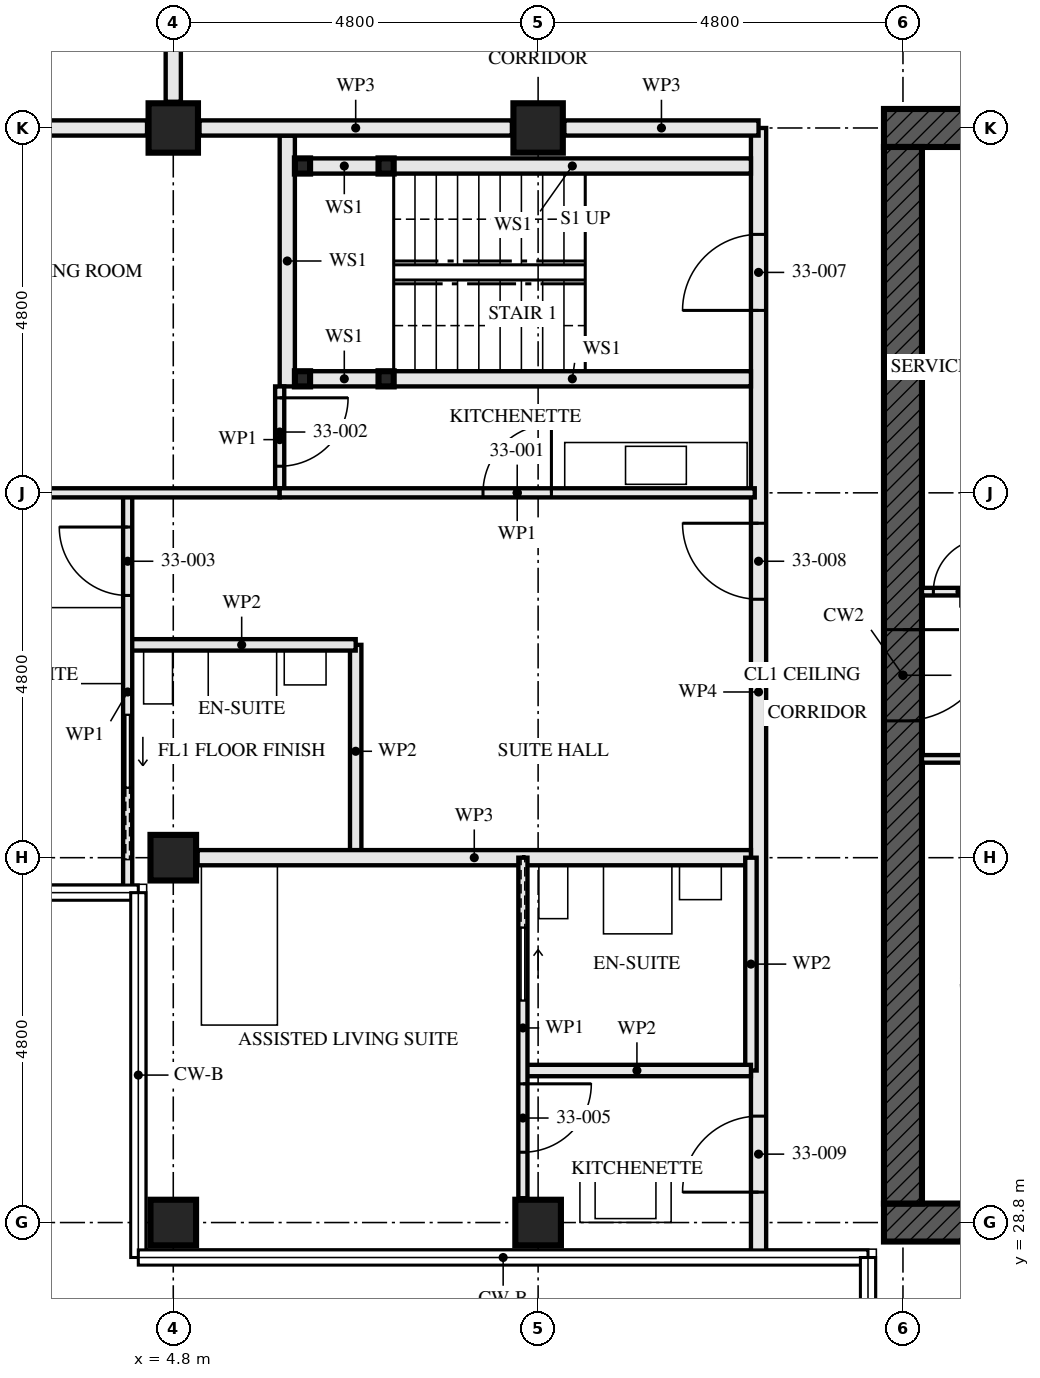
"""IFC4 building model, lengths in metres.
Left out: names, types, materials, properties, quantities, classifications, styles, units other than length and angle.
Written with IfcOpenShell. Run it as: python <this file> out.ifc"""

import sys

from ifc_helpers import new_model, si_unit, direction, frame, frame_2d, origin, origin_2d, place, context, subcontext, project, spatial, rectangle, hollow_rectangle, extrude, element, fill, save


model = new_model("IFC4")
c1 = context("Model", 3, precision=1e-05, world=origin(), true_north=direction((0.0, 1.0)))
c2 = subcontext(c1, "Body", "Model", "MODEL_VIEW")
j1 = project(units=[si_unit("LENGTHUNIT", "METRE"), si_unit("PLANEANGLEUNIT", "RADIAN")], contexts=[c1])
p1 = place(None, origin())
s1 = spatial("IfcSite", under=j1, at=p1, CompositionType="ELEMENT")
p2 = place(p1, origin())
s2 = spatial("IfcBuilding", under=s1, at=p2, CompositionType="ELEMENT")
p3 = place(p2, frame((0.0, 0.0, 122.5)))
s3 = spatial("IfcBuildingStorey", under=s2, at=p3, CompositionType="ELEMENT", Elevation=122.5)
for number, where, z_axis, x_axis in (
    (1, (4.8, 28.8, 0.0), (0.0, 0.0, 1.0), (0.0, 1.0, 0.0)),
    (2, (4.8, 33.6, 0.0), (0.0, 0.0, 1.0), (0.0, 1.0, 0.0)),
):
    element("IfcColumn", number, at=place(p3, frame(where, z_axis=z_axis, x_axis=x_axis)), inside=s3, PredefinedType="COLUMN", context=c2, shape_type="SweptSolid", body=[
        extrude(hollow_rectangle(XDim=0.6, YDim=0.6, WallThickness=0.08, at=origin_2d()), origin(), (0.0, 0.0, 1.0), 3.5),
    ])
p4 = place(p3, frame((4.8, 43.2, 0.0), z_axis=(0.0, 0.0, 1.0), x_axis=(0.0, 1.0, 0.0)))
e3 = element("IfcColumn", 3, at=p4, inside=s3, PredefinedType="COLUMN", context=c2, shape_type="SweptSolid", body=[
    extrude(hollow_rectangle(XDim=0.65, YDim=0.65, WallThickness=0.05, at=origin_2d()), origin(), (0.0, 0.0, 1.0), 3.5),
])
p5 = place(p3, frame((9.6, 28.8, 0.0), z_axis=(0.0, 0.0, 1.0), x_axis=(0.0, 1.0, 0.0)))
e4 = element("IfcColumn", 4, at=p5, inside=s3, PredefinedType="COLUMN", context=c2, shape_type="SweptSolid", body=[
    extrude(hollow_rectangle(XDim=0.6, YDim=0.6, WallThickness=0.08, at=origin_2d()), origin(), (0.0, 0.0, 1.0), 3.5),
])
p6 = place(p3, frame((9.6, 43.2, 0.0), z_axis=(0.0, 0.0, 1.0), x_axis=(0.0, 1.0, 0.0)))
e5 = element("IfcColumn", 5, at=p6, inside=s3, PredefinedType="COLUMN", context=c2, shape_type="SweptSolid", body=[
    extrude(hollow_rectangle(XDim=0.65, YDim=0.65, WallThickness=0.05, at=origin_2d()), origin(), (0.0, 0.0, 1.0), 3.5),
])
p7 = place(p3, frame((14.15, 28.8, -0.17), z_axis=(0.0, 0.0, 1.0), x_axis=(1.0, 0.0, 0.0)))
e6 = element("IfcWall", 6, at=p7, inside=s3, PredefinedType="SHEAR", context=c2, shape_type="SweptSolid", body=[
    extrude(rectangle(XDim=14.9, YDim=0.5, at=frame_2d((7.45, 0.0))), origin(), (0.0, 0.0, 1.0), 3.5),
])
p8 = place(p7, frame((6.85, 0.0, 0.17)))
e7 = element("IfcOpeningElement", 7, at=p8, cuts=e6, PredefinedType="OPENING", context=c2, shape_type="SweptSolid", body=[
    extrude(rectangle(XDim=1.2, YDim=2.1, at=frame_2d((0.6, 1.05))), frame((0.0, 0.26, 0.0), z_axis=(0.0, -1.0, 0.0), x_axis=(1.0, 0.0, 0.0)), (0.0, 0.0, 1.0), 0.521),
])
p9 = place(p3, frame((29.05, 43.2, -0.17), z_axis=(0.0, 0.0, 1.0), x_axis=(-1.0, 0.0, 0.0)))
e8 = element("IfcWall", 8, at=p9, inside=s3, PredefinedType="SHEAR", context=c2, shape_type="SweptSolid", body=[
    extrude(rectangle(XDim=14.9, YDim=0.5, at=frame_2d((7.45, 0.0))), origin(), (0.0, 0.0, 1.0), 3.5),
])
p10 = place(p9, frame((6.85, 0.0, 0.17)))
e9 = element("IfcOpeningElement", 9, at=p10, cuts=e8, PredefinedType="OPENING", context=c2, shape_type="SweptSolid", body=[
    extrude(rectangle(XDim=1.2, YDim=2.1, at=frame_2d((0.6, 1.05))), frame((0.0, 0.26, 0.0), z_axis=(0.0, -1.0, 0.0), x_axis=(1.0, 0.0, 0.0)), (0.0, 0.0, 1.0), 0.521),
])
p11 = place(p3, frame((14.4, 42.95, -0.17), z_axis=(0.0, 0.0, 1.0), x_axis=(0.0, -1.0, 0.0)))
e10 = element("IfcWall", 10, at=p11, inside=s3, PredefinedType="SHEAR", context=c2, shape_type="SweptSolid", body=[
    extrude(rectangle(XDim=13.9, YDim=0.5, at=frame_2d((6.95, 0.0))), origin(), (0.0, 0.0, 1.0), 3.5),
])
p12 = place(p11, frame((6.35, 0.0, 0.17)))
e11 = element("IfcOpeningElement", 11, at=p12, cuts=e10, PredefinedType="OPENING", context=c2, shape_type="SweptSolid", body=[
    extrude(rectangle(XDim=1.2, YDim=2.1, at=frame_2d((0.6, 1.05))), frame((0.0, 0.26, 0.0), z_axis=(0.0, -1.0, 0.0), x_axis=(1.0, 0.0, 0.0)), (0.0, 0.0, 1.0), 0.521),
])
for number, where, z_axis, x_axis in (
    (12, (6.5, 42.7, 0.0), (0.0, 0.0, 1.0), (1.0, 0.0, 0.0)),
    (13, (6.5, 39.9, 0.0), (0.0, 0.0, 1.0), (1.0, 0.0, 0.0)),
    (14, (7.6, 42.7, 0.0), (0.0, 0.0, 1.0), (1.0, 0.0, 0.0)),
    (15, (7.6, 39.9, 0.0), (0.0, 0.0, 1.0), (1.0, 0.0, 0.0)),
):
    element("IfcColumn", number, at=place(p3, frame(where, z_axis=z_axis, x_axis=x_axis)), inside=s3, PredefinedType="COLUMN", context=c2, shape_type="SweptSolid", body=[
        extrude(hollow_rectangle(XDim=0.2, YDim=0.2, WallThickness=0.008, at=origin_2d()), origin(), (0.0, 0.0, 1.0), 3.33),
    ])
p13 = place(p3, frame((6.6, 42.7, 0.0), z_axis=(0.0, 0.0, 1.0), x_axis=(1.0, 0.0, 0.0)))
e16 = element("IfcWall", 16, at=p13, inside=s3, PredefinedType="SOLIDWALL", context=c2, shape_type="SweptSolid", body=[
    extrude(rectangle(XDim=0.9, YDim=0.2, at=frame_2d((0.45, 0.0))), origin(), (0.0, 0.0, 1.0), 2.99),
])
p14 = place(p3, frame((7.7, 42.7, 0.0), z_axis=(0.0, 0.0, 1.0), x_axis=(1.0, 0.0, 0.0)))
e17 = element("IfcWall", 17, at=p14, inside=s3, PredefinedType="SOLIDWALL", context=c2, shape_type="SweptSolid", body=[
    extrude(rectangle(XDim=4.7, YDim=0.2, at=frame_2d((2.35, 0.0))), origin(), (0.0, 0.0, 1.0), 2.99),
])
p15 = place(p3, frame((6.6, 39.9, 0.0), z_axis=(0.0, 0.0, 1.0), x_axis=(1.0, 0.0, 0.0)))
e18 = element("IfcWall", 18, at=p15, inside=s3, PredefinedType="SOLIDWALL", context=c2, shape_type="SweptSolid", body=[
    extrude(rectangle(XDim=0.9, YDim=0.2, at=frame_2d((0.45, 0.0))), origin(), (0.0, 0.0, 1.0), 2.99),
])
p16 = place(p3, frame((7.7, 39.9, 0.0), z_axis=(0.0, 0.0, 1.0), x_axis=(1.0, 0.0, 0.0)))
e19 = element("IfcWall", 19, at=p16, inside=s3, PredefinedType="SOLIDWALL", context=c2, shape_type="SweptSolid", body=[
    extrude(rectangle(XDim=4.7, YDim=0.2, at=frame_2d((2.35, 0.0))), origin(), (0.0, 0.0, 1.0), 2.99),
])
p17 = place(p3, frame((6.3, 43.1, 0.0), z_axis=(0.0, 0.0, 1.0), x_axis=(0.0, -1.0, 0.0)))
e20 = element("IfcWall", 20, at=p17, inside=s3, PredefinedType="SOLIDWALL", context=c2, shape_type="SweptSolid", body=[
    extrude(rectangle(XDim=3.3, YDim=0.2, at=frame_2d((1.65, 0.0))), origin(), (0.0, 0.0, 1.0), 3.33),
])
p18 = place(p3, frame((4.2, 36.4, 0.0), z_axis=(0.0, 0.0, 1.0), x_axis=(1.0, 0.0, 0.0)))
e21 = element("IfcWall", 21, at=p18, inside=s3, PredefinedType="PARTITIONING", context=c2, shape_type="SweptSolid", body=[
    extrude(rectangle(XDim=3.0, YDim=0.15, at=frame_2d((1.5, 0.0))), origin(), (0.0, 0.0, 1.0), 3.33),
])
p19 = place(p3, frame((7.2, 36.4, 0.0), z_axis=(0.0, 0.0, 1.0), x_axis=(0.0, -1.0, 0.0)))
e22 = element("IfcWall", 22, at=p19, inside=s3, PredefinedType="PARTITIONING", context=c2, shape_type="SweptSolid", body=[
    extrude(rectangle(XDim=2.8, YDim=0.15, at=frame_2d((1.4, 0.0))), origin(), (0.0, 0.0, 1.0), 3.33),
])
p20 = place(p3, frame((6.2, 38.4, 0.0), z_axis=(0.0, 0.0, 1.0), x_axis=(1.0, 0.0, 0.0)))
e23 = element("IfcWall", 23, at=p20, inside=s3, PredefinedType="PARTITIONING", context=c2, shape_type="SweptSolid", body=[
    extrude(rectangle(XDim=6.25, YDim=0.12, at=frame_2d((3.125, 0.0))), origin(), (0.0, 0.0, 1.0), 2.55),
])
p21 = place(p20, frame((2.675, 0.0, 0.0)))
e24 = element("IfcOpeningElement", 24, at=p21, cuts=e23, PredefinedType="OPENING", context=c2, shape_type="SweptSolid", body=[
    extrude(rectangle(XDim=0.9, YDim=2.1, at=frame_2d((0.45, 1.05))), frame((0.0, 0.071, 0.0), z_axis=(0.0, -1.0, 0.0), x_axis=(1.0, 0.0, 0.0)), (0.0, 0.0, 1.0), 0.141),
])
p22 = place(p3, frame((6.2, 39.8, 0.0), z_axis=(0.0, 0.0, 1.0), x_axis=(0.0, -1.0, 0.0)))
e25 = element("IfcWall", 25, at=p22, inside=s3, PredefinedType="PARTITIONING", context=c2, shape_type="SweptSolid", body=[
    extrude(rectangle(XDim=1.4, YDim=0.12, at=frame_2d((0.7, 0.0))), origin(), (0.0, 0.0, 1.0), 3.33),
])
p23 = place(p22, frame((0.15, 0.0, 0.0)))
e26 = element("IfcOpeningElement", 26, at=p23, cuts=e25, PredefinedType="OPENING", context=c2, shape_type="SweptSolid", body=[
    extrude(rectangle(XDim=0.9, YDim=2.1, at=frame_2d((0.45, 1.05))), frame((0.0, 0.071, 0.0), z_axis=(0.0, -1.0, 0.0), x_axis=(1.0, 0.0, 0.0)), (0.0, 0.0, 1.0), 0.141),
])
p24 = place(p3, frame((4.2, 38.4, 0.0), z_axis=(0.0, 0.0, 1.0), x_axis=(0.0, -1.0, 0.0)))
e27 = element("IfcWall", 27, at=p24, inside=s3, PredefinedType="PARTITIONING", context=c2, shape_type="SweptSolid", body=[
    extrude(rectangle(XDim=5.24, YDim=0.12, at=frame_2d((2.62, 0.0))), origin(), (0.0, 0.0, 1.0), 2.32),
])
p25 = place(p24, frame((0.45, 0.0, 0.0)))
e28 = element("IfcOpeningElement", 28, at=p25, cuts=e27, PredefinedType="OPENING", context=c2, shape_type="SweptSolid", body=[
    extrude(rectangle(XDim=0.9, YDim=2.1, at=frame_2d((0.45, 1.05))), frame((0.0, 0.071, 0.0), z_axis=(0.0, -1.0, 0.0), x_axis=(1.0, 0.0, 0.0)), (0.0, 0.0, 1.0), 0.141),
])
p26 = place(p24, frame((2.925, 0.0, 0.0)))
e29 = element("IfcOpeningElement", 29, at=p26, cuts=e27, PredefinedType="OPENING", context=c2, shape_type="SweptSolid", body=[
    extrude(rectangle(XDim=0.95, YDim=2.1, at=frame_2d((0.475, 1.05))), frame((0.0, 0.071, 0.0), z_axis=(0.0, -1.0, 0.0), x_axis=(1.0, 0.0, 0.0)), (0.0, 0.0, 1.0), 0.141),
])
p27 = place(p3, frame((0.32, 38.4, 0.0), z_axis=(0.0, 0.0, 1.0), x_axis=(1.0, 0.0, 0.0)))
e30 = element("IfcWall", 30, at=p27, inside=s3, PredefinedType="PARTITIONING", context=c2, shape_type="SweptSolid", body=[
    extrude(rectangle(XDim=5.88, YDim=0.12, at=frame_2d((2.94, 0.0))), origin(), (0.0, 0.0, 1.0), 2.55),
])
p28 = place(p3, frame((5.12, 33.6, 0.0), z_axis=(0.0, 0.0, 1.0), x_axis=(1.0, 0.0, 0.0)))
e31 = element("IfcWall", 31, at=p28, inside=s3, PredefinedType="PARTITIONING", context=c2, shape_type="SweptSolid", body=[
    extrude(rectangle(XDim=7.28, YDim=0.2, at=frame_2d((3.64, 0.0))), origin(), (0.0, 0.0, 1.0), 2.55),
])
p29 = place(p3, frame((9.4, 30.8, 0.0), z_axis=(0.0, 0.0, 1.0), x_axis=(1.0, 0.0, 0.0)))
e32 = element("IfcWall", 32, at=p29, inside=s3, PredefinedType="PARTITIONING", context=c2, shape_type="SweptSolid", body=[
    extrude(rectangle(XDim=3.0, YDim=0.15, at=frame_2d((1.5, 0.0))), origin(), (0.0, 0.0, 1.0), 3.33),
])
p30 = place(p3, frame((12.4, 33.6, 0.0), z_axis=(0.0, 0.0, 1.0), x_axis=(0.0, -1.0, 0.0)))
e33 = element("IfcWall", 33, at=p30, inside=s3, PredefinedType="PARTITIONING", context=c2, shape_type="SweptSolid", body=[
    extrude(rectangle(XDim=2.8, YDim=0.15, at=frame_2d((1.4, 0.0))), origin(), (0.0, 0.0, 1.0), 3.33),
])
p31 = place(p3, frame((9.4, 33.6, 0.0), z_axis=(0.0, 0.0, 1.0), x_axis=(0.0, -1.0, 0.0)))
e34 = element("IfcWall", 34, at=p31, inside=s3, PredefinedType="PARTITIONING", context=c2, shape_type="SweptSolid", body=[
    extrude(rectangle(XDim=4.48, YDim=0.12, at=frame_2d((2.24, 0.0))), origin(), (0.0, 0.0, 1.0), 3.33),
])
p32 = place(p31, frame((2.975, 0.0, 0.0)))
e35 = element("IfcOpeningElement", 35, at=p32, cuts=e34, PredefinedType="OPENING", context=c2, shape_type="SweptSolid", body=[
    extrude(rectangle(XDim=0.9, YDim=2.1, at=frame_2d((0.45, 1.05))), frame((0.0, 0.071, 0.0), z_axis=(0.0, -1.0, 0.0), x_axis=(1.0, 0.0, 0.0)), (0.0, 0.0, 1.0), 0.141),
])
p33 = place(p31, frame((0.925, 0.0, 0.0)))
e36 = element("IfcOpeningElement", 36, at=p33, cuts=e34, PredefinedType="OPENING", context=c2, shape_type="SweptSolid", body=[
    extrude(rectangle(XDim=0.95, YDim=2.1, at=frame_2d((0.475, 1.05))), frame((0.0, 0.071, 0.0), z_axis=(0.0, -1.0, 0.0), x_axis=(1.0, 0.0, 0.0)), (0.0, 0.0, 1.0), 0.141),
])
p34 = place(p3, frame((12.5, 43.2, 0.0), z_axis=(0.0, 0.0, 1.0), x_axis=(0.0, -1.0, 0.0)))
e37 = element("IfcWall", 37, at=p34, inside=s3, PredefinedType="PARTITIONING", context=c2, shape_type="SweptSolid", body=[
    extrude(rectangle(XDim=14.84, YDim=0.2, at=frame_2d((7.42, 0.0))), origin(), (0.0, 0.0, 1.0), 2.32),
])
p35 = place(p34, frame((1.4, 0.0, 0.0)))
e38 = element("IfcOpeningElement", 38, at=p35, cuts=e37, PredefinedType="OPENING", context=c2, shape_type="SweptSolid", body=[
    extrude(rectangle(XDim=1.0, YDim=2.1, at=frame_2d((0.5, 1.05))), frame((0.0, 0.111, 0.0), z_axis=(0.0, -1.0, 0.0), x_axis=(1.0, 0.0, 0.0)), (0.0, 0.0, 1.0), 0.221),
])
p36 = place(p34, frame((5.2, 0.0, 0.0)))
e39 = element("IfcOpeningElement", 39, at=p36, cuts=e37, PredefinedType="OPENING", context=c2, shape_type="SweptSolid", body=[
    extrude(rectangle(XDim=1.0, YDim=2.1, at=frame_2d((0.5, 1.05))), frame((0.0, 0.111, 0.0), z_axis=(0.0, -1.0, 0.0), x_axis=(1.0, 0.0, 0.0)), (0.0, 0.0, 1.0), 0.221),
])
p37 = place(p34, frame((13.0, 0.0, 0.0)))
e40 = element("IfcOpeningElement", 40, at=p37, cuts=e37, PredefinedType="OPENING", context=c2, shape_type="SweptSolid", body=[
    extrude(rectangle(XDim=1.0, YDim=2.1, at=frame_2d((0.5, 1.05))), frame((0.0, 0.111, 0.0), z_axis=(0.0, -1.0, 0.0), x_axis=(1.0, 0.0, 0.0)), (0.0, 0.0, 1.0), 0.221),
])
p38 = place(p3, frame((4.8, 45.2, 0.0), z_axis=(0.0, 0.0, 1.0), x_axis=(0.0, -1.0, 0.0)))
e41 = element("IfcWall", 41, at=p38, inside=s3, PredefinedType="PARTITIONING", context=c2, shape_type="SweptSolid", body=[
    extrude(rectangle(XDim=1.655, YDim=0.2, at=frame_2d((0.828, 0.0))), origin(), (0.0, 0.0, 1.0), 3.33),
])
p39 = place(p3, frame((14.65, 34.9, 0.0), z_axis=(0.0, 0.0, 1.0), x_axis=(1.0, 0.0, 0.0)))
e42 = element("IfcWall", 42, at=p39, inside=s3, PredefinedType="SOLIDWALL", context=c2, shape_type="SweptSolid", body=[
    extrude(rectangle(XDim=5.9, YDim=0.1, at=frame_2d((2.95, 0.0))), origin(), (0.0, 0.0, 1.0), 3.33),
])
p40 = place(p39, frame((1.6, 0.0, 0.0)))
e43 = element("IfcOpeningElement", 43, at=p40, cuts=e42, PredefinedType="OPENING", context=c2, shape_type="SweptSolid", body=[
    extrude(rectangle(XDim=0.7, YDim=2.1, at=frame_2d((0.35, 1.05))), frame((0.0, 0.061, 0.0), z_axis=(0.0, -1.0, 0.0), x_axis=(1.0, 0.0, 0.0)), (0.0, 0.0, 1.0), 0.121),
])
p41 = place(p3, frame((14.65, 37.1, 0.0), z_axis=(0.0, 0.0, 1.0), x_axis=(1.0, 0.0, 0.0)))
e44 = element("IfcWall", 44, at=p41, inside=s3, PredefinedType="SOLIDWALL", context=c2, shape_type="SweptSolid", body=[
    extrude(rectangle(XDim=5.9, YDim=0.1, at=frame_2d((2.95, 0.0))), origin(), (0.0, 0.0, 1.0), 3.33),
])
p42 = place(p41, frame((0.15, 0.0, 0.0)))
e45 = element("IfcOpeningElement", 45, at=p42, cuts=e44, PredefinedType="OPENING", context=c2, shape_type="SweptSolid", body=[
    extrude(rectangle(XDim=0.7, YDim=2.1, at=frame_2d((0.35, 1.05))), frame((0.0, 0.061, 0.0), z_axis=(0.0, -1.0, 0.0), x_axis=(1.0, 0.0, 0.0)), (0.0, 0.0, 1.0), 0.121),
])
p43 = place(p41, frame((1.5, 0.0, 0.0)))
e46 = element("IfcOpeningElement", 46, at=p43, cuts=e44, PredefinedType="OPENING", context=c2, shape_type="SweptSolid", body=[
    extrude(rectangle(XDim=0.9, YDim=2.1, at=frame_2d((0.45, 1.05))), frame((0.0, 0.061, 0.0), z_axis=(0.0, -1.0, 0.0), x_axis=(1.0, 0.0, 0.0)), (0.0, 0.0, 1.0), 0.121),
])
p44 = place(p3, frame((12.5, 43.2, 0.0), z_axis=(0.0, 0.0, 1.0), x_axis=(-1.0, 0.0, 0.0)))
e47 = element("IfcWall", 47, at=p44, inside=s3, PredefinedType="PARTITIONING", context=c2, shape_type="SweptSolid", body=[
    extrude(rectangle(XDim=2.555, YDim=0.2, at=frame_2d((1.277, 0.0))), origin(), (0.0, 0.0, 1.0), 2.32),
])
p45 = place(p3, frame((9.255, 43.2, 0.0), z_axis=(0.0, 0.0, 1.0), x_axis=(-1.0, 0.0, 0.0)))
e48 = element("IfcWall", 48, at=p45, inside=s3, PredefinedType="PARTITIONING", context=c2, shape_type="SweptSolid", body=[
    extrude(rectangle(XDim=4.11, YDim=0.2, at=frame_2d((2.055, 0.0))), origin(), (0.0, 0.0, 1.0), 2.32),
])
p46 = place(p3, frame((4.455, 43.2, 0.0), z_axis=(0.0, 0.0, 1.0), x_axis=(-1.0, 0.0, 0.0)))
e49 = element("IfcWall", 49, at=p46, inside=s3, PredefinedType="PARTITIONING", context=c2, shape_type="SweptSolid", body=[
    extrude(rectangle(XDim=4.135, YDim=0.2, at=frame_2d((2.067, 0.0))), origin(), (0.0, 0.0, 1.0), 2.32),
])
p47 = place(p21, origin())
e50 = element("IfcDoor", 50, at=p47, inside=s3, OperationType="SINGLE_SWING_LEFT", PredefinedType="DOOR", context=c2, shape_type="SweptSolid", body=[
    extrude(rectangle(XDim=0.9, YDim=2.1, at=frame_2d((0.45, 1.05))), frame((0.0, 0.022, 0.0), z_axis=(0.0, -1.0, 0.0), x_axis=(1.0, 0.0, 0.0)), (0.0, 0.0, 1.0), 0.044),
])
fill(e24, e50)
p48 = place(p23, origin())
e51 = element("IfcDoor", 51, at=p48, inside=s3, OperationType="SINGLE_SWING_RIGHT", PredefinedType="DOOR", context=c2, shape_type="SweptSolid", body=[
    extrude(rectangle(XDim=0.9, YDim=2.1, at=frame_2d((0.45, 1.05))), frame((0.0, 0.022, 0.0), z_axis=(0.0, -1.0, 0.0), x_axis=(1.0, 0.0, 0.0)), (0.0, 0.0, 1.0), 0.044),
])
fill(e26, e51)
p49 = place(p25, frame((0.9, 0.0, 0.0), z_axis=(0.0, 0.0, 1.0), x_axis=(-1.0, 0.0, 0.0)))
e52 = element("IfcDoor", 52, at=p49, inside=s3, OperationType="SINGLE_SWING_LEFT", PredefinedType="DOOR", context=c2, shape_type="SweptSolid", body=[
    extrude(rectangle(XDim=0.9, YDim=2.1, at=frame_2d((0.45, 1.05))), frame((0.0, 0.022, 0.0), z_axis=(0.0, -1.0, 0.0), x_axis=(1.0, 0.0, 0.0)), (0.0, 0.0, 1.0), 0.044),
])
fill(e28, e52)
p50 = place(p26, origin())
e53 = element("IfcDoor", 53, at=p50, inside=s3, OperationType="SLIDING_TO_LEFT", PredefinedType="DOOR", context=c2, shape_type="SweptSolid", body=[
    extrude(rectangle(XDim=0.95, YDim=2.1, at=frame_2d((0.475, 1.05))), frame((0.0, 0.022, 0.0), z_axis=(0.0, -1.0, 0.0), x_axis=(1.0, 0.0, 0.0)), (0.0, 0.0, 1.0), 0.044),
])
fill(e29, e53)
p51 = place(p32, origin())
e54 = element("IfcDoor", 54, at=p51, inside=s3, OperationType="SINGLE_SWING_RIGHT", PredefinedType="DOOR", context=c2, shape_type="SweptSolid", body=[
    extrude(rectangle(XDim=0.9, YDim=2.1, at=frame_2d((0.45, 1.05))), frame((0.0, 0.022, 0.0), z_axis=(0.0, -1.0, 0.0), x_axis=(1.0, 0.0, 0.0)), (0.0, 0.0, 1.0), 0.044),
])
fill(e35, e54)
p52 = place(p33, origin())
e55 = element("IfcDoor", 55, at=p52, inside=s3, OperationType="SLIDING_TO_RIGHT", PredefinedType="DOOR", context=c2, shape_type="SweptSolid", body=[
    extrude(rectangle(XDim=0.95, YDim=2.1, at=frame_2d((0.475, 1.05))), frame((0.0, 0.022, 0.0), z_axis=(0.0, -1.0, 0.0), x_axis=(1.0, 0.0, 0.0)), (0.0, 0.0, 1.0), 0.044),
])
fill(e36, e55)
p53 = place(p35, frame((1.0, 0.0, 0.0), z_axis=(0.0, 0.0, 1.0), x_axis=(-1.0, 0.0, 0.0)))
e56 = element("IfcDoor", 56, at=p53, inside=s3, OperationType="SINGLE_SWING_RIGHT", PredefinedType="DOOR", context=c2, shape_type="SweptSolid", body=[
    extrude(rectangle(XDim=1.0, YDim=2.1, at=frame_2d((0.5, 1.05))), frame((0.0, 0.032, 0.0), z_axis=(0.0, -1.0, 0.0), x_axis=(1.0, 0.0, 0.0)), (0.0, 0.0, 1.0), 0.064),
])
fill(e38, e56)
p54 = place(p36, frame((1.0, 0.0, 0.0), z_axis=(0.0, 0.0, 1.0), x_axis=(-1.0, 0.0, 0.0)))
e57 = element("IfcDoor", 57, at=p54, inside=s3, OperationType="SINGLE_SWING_LEFT", PredefinedType="DOOR", context=c2, shape_type="SweptSolid", body=[
    extrude(rectangle(XDim=1.0, YDim=2.1, at=frame_2d((0.5, 1.05))), frame((0.0, 0.027, 0.0), z_axis=(0.0, -1.0, 0.0), x_axis=(1.0, 0.0, 0.0)), (0.0, 0.0, 1.0), 0.054),
])
fill(e39, e57)
p55 = place(p37, frame((1.0, 0.0, 0.0), z_axis=(0.0, 0.0, 1.0), x_axis=(-1.0, 0.0, 0.0)))
e58 = element("IfcDoor", 58, at=p55, inside=s3, OperationType="SINGLE_SWING_RIGHT", PredefinedType="DOOR", context=c2, shape_type="SweptSolid", body=[
    extrude(rectangle(XDim=1.0, YDim=2.1, at=frame_2d((0.5, 1.05))), frame((0.0, 0.027, 0.0), z_axis=(0.0, -1.0, 0.0), x_axis=(1.0, 0.0, 0.0)), (0.0, 0.0, 1.0), 0.054),
])
fill(e40, e58)
p56 = place(p42, origin())
e59 = element("IfcDoor", 59, at=p56, inside=s3, OperationType="SINGLE_SWING_LEFT", PredefinedType="DOOR", context=c2, shape_type="SweptSolid", body=[
    extrude(rectangle(XDim=0.7, YDim=2.1, at=frame_2d((0.35, 1.05))), frame((0.0, 0.027, 0.0), z_axis=(0.0, -1.0, 0.0), x_axis=(1.0, 0.0, 0.0)), (0.0, 0.0, 1.0), 0.054),
])
fill(e45, e59)
p57 = place(p12, origin())
e60 = element("IfcDoor", 60, at=p57, inside=s3, OperationType="SINGLE_SWING_LEFT", PredefinedType="DOOR", context=c2, shape_type="SweptSolid", body=[
    extrude(rectangle(XDim=1.2, YDim=2.1, at=frame_2d((0.6, 1.05))), frame((0.0, 0.027, 0.0), z_axis=(0.0, -1.0, 0.0), x_axis=(1.0, 0.0, 0.0)), (0.0, 0.0, 1.0), 0.054),
])
fill(e11, e60)
save(model, sys.argv[1])
